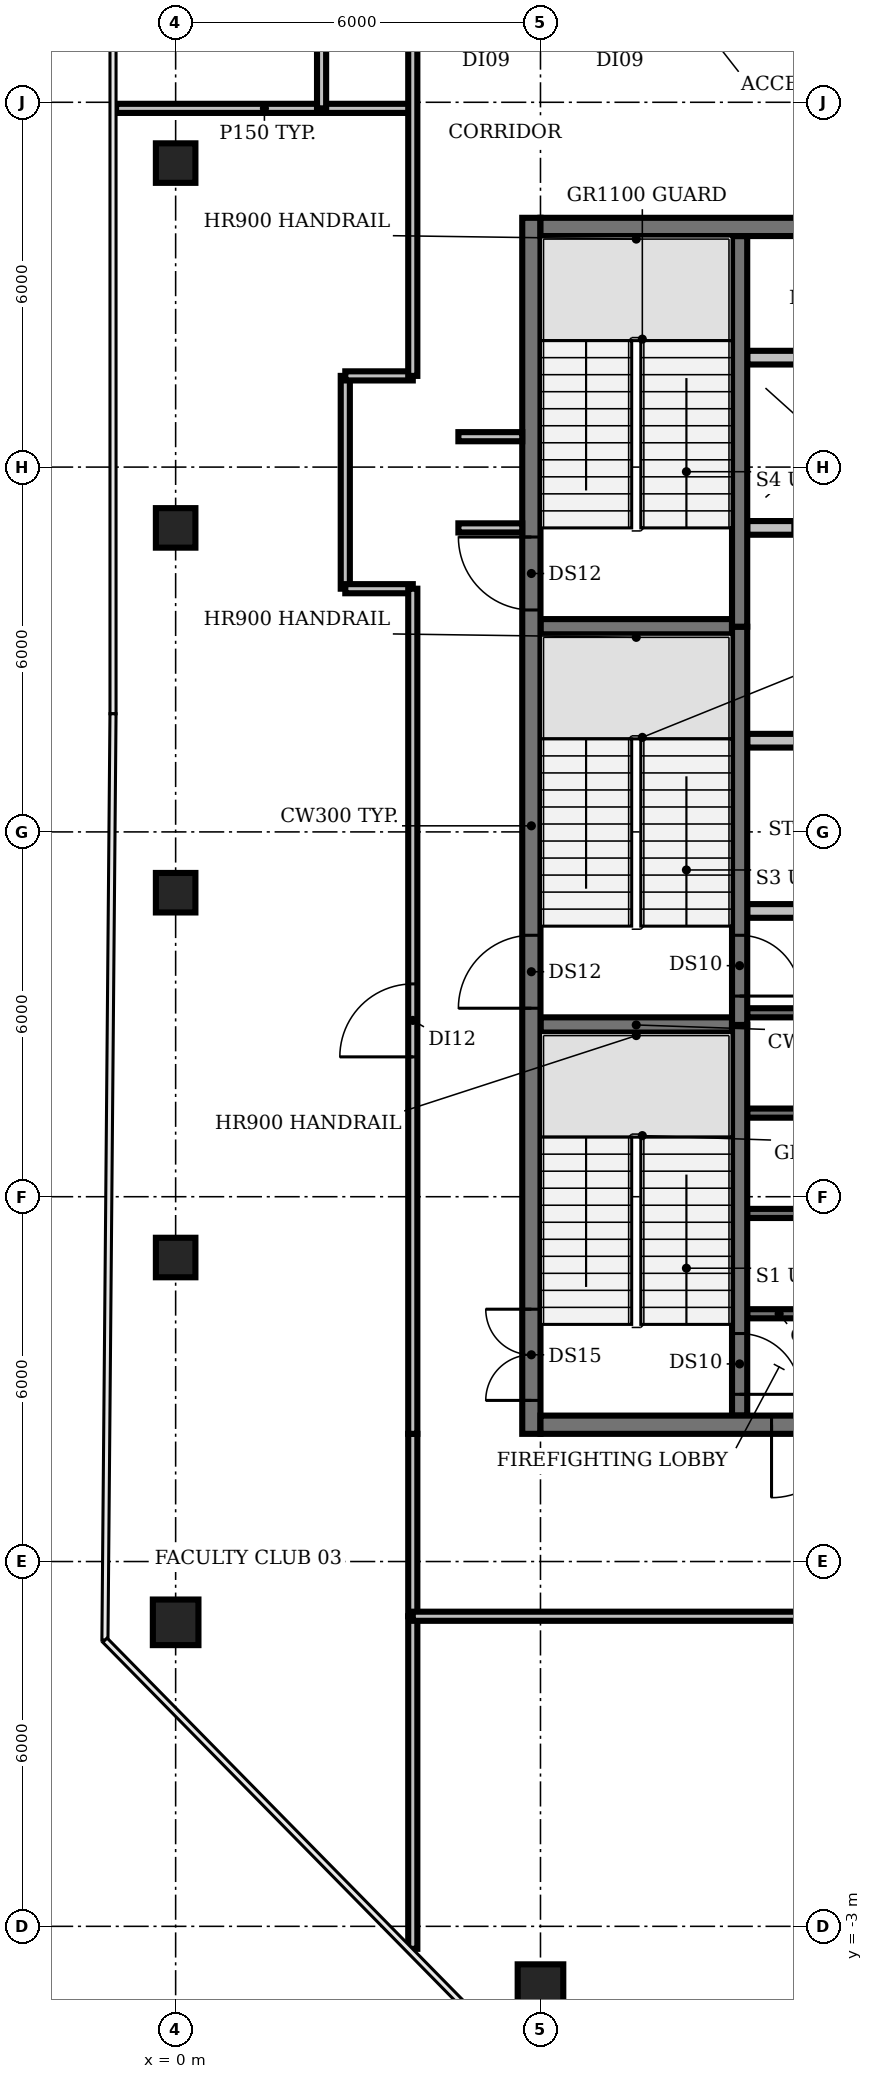
"""IFC4 building model, lengths in metres.
Left out: names, types, materials, properties, quantities, classifications, styles, units other than length and angle.
Written with IfcOpenShell. Run it as: python <this file> out.ifc"""

import sys

from ifc_helpers import new_model, si_unit, direction, frame, frame_2d, origin, origin_2d, place, context, subcontext, project, spatial, rectangle, circle, extrude, element, fill, save


model = new_model("IFC4")
c1 = context("Model", 3, precision=1e-05, world=origin(), true_north=direction((0.0, 1.0)))
c2 = subcontext(c1, "Body", "Model", "MODEL_VIEW")
j1 = project(units=[si_unit("LENGTHUNIT", "METRE"), si_unit("PLANEANGLEUNIT", "RADIAN")], contexts=[c1])
p1 = place(None, origin())
s1 = spatial("IfcSite", under=j1, at=p1, CompositionType="ELEMENT")
p2 = place(p1, origin())
s2 = spatial("IfcBuilding", under=s1, at=p2, CompositionType="ELEMENT")
p3 = place(p2, frame((0.0, 0.0, 335.6)))
s3 = spatial("IfcBuildingStorey", under=s2, at=p3, CompositionType="ELEMENT", Elevation=335.6)
p4 = place(p3, frame((0.0, 2.0, 0.0), z_axis=(0.0, 0.0, 1.0), x_axis=(1.0, 0.0, 0.0)))
e1 = element("IfcColumn", 1, at=p4, inside=s3, PredefinedType="COLUMN", context=c2, shape_type="SweptSolid", body=[
    extrude(circle(Radius=0.375, at=origin_2d()), origin(), (0.0, 0.0, 1.0), 3.9),
])
for number, where, z_axis, x_axis in (
    (2, (0.0, 8.0, 0.0), (0.0, 0.0, 1.0), (1.0, 0.0, 0.0)),
    (3, (0.0, 14.0, 0.0), (0.0, 0.0, 1.0), (1.0, 0.0, 0.0)),
    (4, (0.0, 20.0, 0.0), (0.0, 0.0, 1.0), (1.0, 0.0, 0.0)),
    (5, (0.0, 26.0, 0.0), (0.0, 0.0, 1.0), (1.0, 0.0, 0.0)),
):
    element("IfcColumn", number, at=place(p3, frame(where, z_axis=z_axis, x_axis=x_axis)), inside=s3, PredefinedType="COLUMN", context=c2, shape_type="SweptSolid", body=[
        extrude(rectangle(XDim=0.65, YDim=0.65, at=origin_2d()), origin(), (0.0, 0.0, 1.0), 3.9),
    ])
p5 = place(p3, frame((6.0, -4.0, 0.0), z_axis=(0.0, 0.0, 1.0), x_axis=(1.0, 0.0, 0.0)))
e6 = element("IfcColumn", 6, at=p5, inside=s3, PredefinedType="COLUMN", context=c2, shape_type="SweptSolid", body=[
    extrude(circle(Radius=0.375, at=origin_2d()), origin(), (0.0, 0.0, 1.0), 3.9),
])
for number, where, z_axis, x_axis in (
    (7, (9.4, 7.075, 0.0), (0.0, 0.0, 1.0), (1.0, 0.0, 0.0)),
    (8, (9.4, 8.725, 0.0), (0.0, 0.0, 1.0), (1.0, 0.0, 0.0)),
    (9, (9.4, 10.375, 0.0), (0.0, 0.0, 1.0), (1.0, 0.0, 0.0)),
):
    element("IfcWall", number, at=place(p3, frame(where, z_axis=z_axis, x_axis=x_axis)), inside=s3, PredefinedType="SHEAR", context=c2, shape_type="SweptSolid", body=[
        extrude(rectangle(XDim=1.05, YDim=0.15, at=frame_2d((0.525, 0.0))), origin(), (0.0, 0.0, 1.0), 3.9),
    ])
p6 = place(p3, frame((6.0, 11.825, 0.0), z_axis=(0.0, 0.0, 1.0), x_axis=(1.0, 0.0, 0.0)))
e10 = element("IfcWall", 10, at=p6, inside=s3, PredefinedType="SHEAR", context=c2, shape_type="SweptSolid", body=[
    extrude(rectangle(XDim=3.15, YDim=0.25, at=frame_2d((1.575, 0.0))), origin(), (0.0, 0.0, 1.0), 3.9),
])
p7 = place(p3, frame((9.4, 12.025, 0.0), z_axis=(0.0, 0.0, 1.0), x_axis=(1.0, 0.0, 0.0)))
e11 = element("IfcWall", 11, at=p7, inside=s3, PredefinedType="SHEAR", context=c2, shape_type="SweptSolid", body=[
    extrude(rectangle(XDim=1.05, YDim=0.15, at=frame_2d((0.525, 0.0))), origin(), (0.0, 0.0, 1.0), 3.9),
])
p8 = place(p3, frame((9.4, 13.7, 0.0), z_axis=(0.0, 0.0, 1.0), x_axis=(1.0, 0.0, 0.0)))
e12 = element("IfcWall", 12, at=p8, inside=s3, PredefinedType="PARTITIONING", context=c2, shape_type="SweptSolid", body=[
    extrude(rectangle(XDim=4.0, YDim=0.225, at=frame_2d((2.0, 0.0))), origin(), (0.0, 0.0, 1.0), 3.9),
])
p9 = place(p3, frame((9.4, 16.5, 0.0), z_axis=(0.0, 0.0, 1.0), x_axis=(1.0, 0.0, 0.0)))
e13 = element("IfcWall", 13, at=p9, inside=s3, PredefinedType="PARTITIONING", context=c2, shape_type="SweptSolid", body=[
    extrude(rectangle(XDim=14.6, YDim=0.225, at=frame_2d((7.3, 0.0))), origin(), (0.0, 0.0, 1.0), 3.9),
])
p10 = place(p9, frame((0.85, 0.0, 0.0)))
e14 = element("IfcOpeningElement", 14, at=p10, cuts=e13, PredefinedType="OPENING", context=c2, shape_type="SweptSolid", body=[
    extrude(rectangle(XDim=0.9, YDim=2.1, at=frame_2d((0.45, 1.05))), frame((0.0, 0.123, 0.0), z_axis=(0.0, -1.0, 0.0), x_axis=(1.0, 0.0, 0.0)), (0.0, 0.0, 1.0), 0.245),
])
p11 = place(p9, frame((3.625, 0.0, 0.0)))
e15 = element("IfcOpeningElement", 15, at=p11, cuts=e13, PredefinedType="OPENING", context=c2, shape_type="SweptSolid", body=[
    extrude(rectangle(XDim=0.9, YDim=2.1, at=frame_2d((0.45, 1.05))), frame((0.0, 0.123, 0.0), z_axis=(0.0, -1.0, 0.0), x_axis=(1.0, 0.0, 0.0)), (0.0, 0.0, 1.0), 0.245),
])
p12 = place(p9, frame((7.775, 0.0, 0.0)))
e16 = element("IfcOpeningElement", 16, at=p12, cuts=e13, PredefinedType="OPENING", context=c2, shape_type="SweptSolid", body=[
    extrude(rectangle(XDim=1.0, YDim=2.1, at=frame_2d((0.5, 1.05))), frame((0.0, 0.123, 0.0), z_axis=(0.0, -1.0, 0.0), x_axis=(1.0, 0.0, 0.0)), (0.0, 0.0, 1.0), 0.245),
])
p13 = place(p9, frame((11.647, 0.0, 0.0)))
e17 = element("IfcOpeningElement", 17, at=p13, cuts=e13, PredefinedType="OPENING", context=c2, shape_type="SweptSolid", body=[
    extrude(rectangle(XDim=0.9, YDim=2.1, at=frame_2d((0.45, 1.05))), frame((0.0, 0.123, 0.0), z_axis=(0.0, -1.0, 0.0), x_axis=(1.0, 0.0, 0.0)), (0.0, 0.0, 1.0), 0.245),
])
p14 = place(p9, frame((13.423, 0.0, 0.0)))
e18 = element("IfcOpeningElement", 18, at=p14, cuts=e13, PredefinedType="OPENING", context=c2, shape_type="SweptSolid", body=[
    extrude(rectangle(XDim=0.9, YDim=2.1, at=frame_2d((0.45, 1.05))), frame((0.0, 0.123, 0.0), z_axis=(0.0, -1.0, 0.0), x_axis=(1.0, 0.0, 0.0)), (0.0, 0.0, 1.0), 0.245),
])
p15 = place(p3, frame((6.0, 18.375, 0.0), z_axis=(0.0, 0.0, 1.0), x_axis=(1.0, 0.0, 0.0)))
e19 = element("IfcWall", 19, at=p15, inside=s3, PredefinedType="SHEAR", context=c2, shape_type="SweptSolid", body=[
    extrude(rectangle(XDim=3.15, YDim=0.25, at=frame_2d((1.575, 0.0))), origin(), (0.0, 0.0, 1.0), 3.9),
])
p16 = place(p3, frame((24.0, 20.0, 0.0), z_axis=(0.0, 0.0, 1.0), x_axis=(-1.0, 0.0, 0.0)))
e20 = element("IfcWall", 20, at=p16, inside=s3, PredefinedType="PARTITIONING", context=c2, shape_type="SweptSolid", body=[
    extrude(rectangle(XDim=14.6, YDim=0.225, at=frame_2d((7.3, 0.0))), origin(), (0.0, 0.0, 1.0), 3.9),
])
p17 = place(p16, frame((12.75, 0.0, 0.0)))
e21 = element("IfcOpeningElement", 21, at=p17, cuts=e20, PredefinedType="OPENING", context=c2, shape_type="SweptSolid", body=[
    extrude(rectangle(XDim=1.1, YDim=2.1, at=frame_2d((0.55, 1.05))), frame((0.0, 0.123, 0.0), z_axis=(0.0, -1.0, 0.0), x_axis=(1.0, 0.0, 0.0)), (0.0, 0.0, 1.0), 0.245),
])
p18 = place(p16, frame((9.95, 0.0, 0.0)))
e22 = element("IfcOpeningElement", 22, at=p18, cuts=e20, PredefinedType="OPENING", context=c2, shape_type="SweptSolid", body=[
    extrude(rectangle(XDim=1.1, YDim=2.1, at=frame_2d((0.55, 1.05))), frame((0.0, 0.123, 0.0), z_axis=(0.0, -1.0, 0.0), x_axis=(1.0, 0.0, 0.0)), (0.0, 0.0, 1.0), 0.245),
])
p19 = place(p16, frame((7.15, 0.0, 0.0)))
e23 = element("IfcOpeningElement", 23, at=p19, cuts=e20, PredefinedType="OPENING", context=c2, shape_type="SweptSolid", body=[
    extrude(rectangle(XDim=1.1, YDim=2.1, at=frame_2d((0.55, 1.05))), frame((0.0, 0.123, 0.0), z_axis=(0.0, -1.0, 0.0), x_axis=(1.0, 0.0, 0.0)), (0.0, 0.0, 1.0), 0.245),
])
p20 = place(p16, frame((4.35, 0.0, 0.0)))
e24 = element("IfcOpeningElement", 24, at=p20, cuts=e20, PredefinedType="OPENING", context=c2, shape_type="SweptSolid", body=[
    extrude(rectangle(XDim=1.1, YDim=2.1, at=frame_2d((0.55, 1.05))), frame((0.0, 0.123, 0.0), z_axis=(0.0, -1.0, 0.0), x_axis=(1.0, 0.0, 0.0)), (0.0, 0.0, 1.0), 0.245),
])
p21 = place(p16, frame((2.137, 0.0, 0.0)))
e25 = element("IfcOpeningElement", 25, at=p21, cuts=e20, PredefinedType="OPENING", context=c2, shape_type="SweptSolid", body=[
    extrude(rectangle(XDim=0.9, YDim=2.1, at=frame_2d((0.45, 1.05))), frame((0.0, 0.123, 0.0), z_axis=(0.0, -1.0, 0.0), x_axis=(1.0, 0.0, 0.0)), (0.0, 0.0, 1.0), 0.245),
])
p22 = place(p16, frame((0.562, 0.0, 0.0)))
e26 = element("IfcOpeningElement", 26, at=p22, cuts=e20, PredefinedType="OPENING", context=c2, shape_type="SweptSolid", body=[
    extrude(rectangle(XDim=0.9, YDim=2.1, at=frame_2d((0.45, 1.05))), frame((0.0, 0.123, 0.0), z_axis=(0.0, -1.0, 0.0), x_axis=(1.0, 0.0, 0.0)), (0.0, 0.0, 1.0), 0.245),
])
p23 = place(p3, frame((9.4, 22.8, 0.0), z_axis=(0.0, 0.0, 1.0), x_axis=(1.0, 0.0, 0.0)))
e27 = element("IfcWall", 27, at=p23, inside=s3, PredefinedType="PARTITIONING", context=c2, shape_type="SweptSolid", body=[
    extrude(rectangle(XDim=14.6, YDim=0.225, at=frame_2d((7.3, 0.0))), origin(), (0.0, 0.0, 1.0), 3.9),
])
p24 = place(p3, frame((9.275, 11.825, 0.0), z_axis=(0.0, 0.0, 1.0), x_axis=(0.0, -1.0, 0.0)))
e28 = element("IfcWall", 28, at=p24, inside=s3, PredefinedType="SHEAR", context=c2, shape_type="SweptSolid", body=[
    extrude(rectangle(XDim=6.425, YDim=0.25, at=frame_2d((3.212, 0.0))), origin(), (0.0, 0.0, 1.0), 3.9),
])
p25 = place(p24, frame((5.075, 0.0, 0.0)))
e29 = element("IfcOpeningElement", 29, at=p25, cuts=e28, PredefinedType="OPENING", context=c2, shape_type="SweptSolid", body=[
    extrude(rectangle(XDim=1.0, YDim=2.1, at=frame_2d((0.5, 1.05))), frame((0.0, 0.135, 0.0), z_axis=(0.0, -1.0, 0.0), x_axis=(1.0, 0.0, 0.0)), (0.0, 0.0, 1.0), 0.27),
])
p26 = place(p3, frame((9.275, 18.375, 0.0), z_axis=(0.0, 0.0, 1.0), x_axis=(0.0, -1.0, 0.0)))
e30 = element("IfcWall", 30, at=p26, inside=s3, PredefinedType="SHEAR", context=c2, shape_type="SweptSolid", body=[
    extrude(rectangle(XDim=6.55, YDim=0.25, at=frame_2d((3.275, 0.0))), origin(), (0.0, 0.0, 1.0), 3.9),
])
p27 = place(p26, frame((5.075, 0.0, 0.0)))
e31 = element("IfcOpeningElement", 31, at=p27, cuts=e30, PredefinedType="OPENING", context=c2, shape_type="SweptSolid", body=[
    extrude(rectangle(XDim=1.0, YDim=2.1, at=frame_2d((0.5, 1.05))), frame((0.0, 0.135, 0.0), z_axis=(0.0, -1.0, 0.0), x_axis=(1.0, 0.0, 0.0)), (0.0, 0.0, 1.0), 0.27),
])
p28 = place(p3, frame((9.275, 18.375, 0.0), z_axis=(0.0, 0.0, 1.0), x_axis=(0.0, 1.0, 0.0)))
e32 = element("IfcWall", 32, at=p28, inside=s3, PredefinedType="SHEAR", context=c2, shape_type="SweptSolid", body=[
    extrude(rectangle(XDim=6.425, YDim=0.25, at=frame_2d((3.212, 0.0))), origin(), (0.0, 0.0, 1.0), 3.9),
])
p29 = place(p3, frame((5.85, 5.1, 0.0), z_axis=(0.0, 0.0, 1.0), x_axis=(0.0, 1.0, 0.0)))
e33 = element("IfcWall", 33, at=p29, inside=s3, PredefinedType="SHEAR", context=c2, shape_type="SweptSolid", body=[
    extrude(rectangle(XDim=20.0, YDim=0.3, at=frame_2d((10.0, 0.0))), origin(), (0.0, 0.0, 1.0), 3.9),
])
p30 = place(p29, frame((0.55, 0.0, 0.0)))
e34 = element("IfcOpeningElement", 34, at=p30, cuts=e33, PredefinedType="OPENING", context=c2, shape_type="SweptSolid", body=[
    extrude(rectangle(XDim=1.5, YDim=2.1, at=frame_2d((0.75, 1.05))), frame((0.0, 0.16, 0.0), z_axis=(0.0, -1.0, 0.0), x_axis=(1.0, 0.0, 0.0)), (0.0, 0.0, 1.0), 0.32),
])
p31 = place(p29, frame((7.0, 0.0, 0.0)))
e35 = element("IfcOpeningElement", 35, at=p31, cuts=e33, PredefinedType="OPENING", context=c2, shape_type="SweptSolid", body=[
    extrude(rectangle(XDim=1.2, YDim=2.1, at=frame_2d((0.6, 1.05))), frame((0.0, 0.16, 0.0), z_axis=(0.0, -1.0, 0.0), x_axis=(1.0, 0.0, 0.0)), (0.0, 0.0, 1.0), 0.32),
])
p32 = place(p29, frame((13.55, 0.0, 0.0)))
e36 = element("IfcOpeningElement", 36, at=p32, cuts=e33, PredefinedType="OPENING", context=c2, shape_type="SweptSolid", body=[
    extrude(rectangle(XDim=1.2, YDim=2.1, at=frame_2d((0.6, 1.05))), frame((0.0, 0.16, 0.0), z_axis=(0.0, -1.0, 0.0), x_axis=(1.0, 0.0, 0.0)), (0.0, 0.0, 1.0), 0.32),
])
p33 = place(p3, frame((24.0, 5.25, 0.0), z_axis=(0.0, 0.0, 1.0), x_axis=(-1.0, 0.0, 0.0)))
e37 = element("IfcWall", 37, at=p33, inside=s3, PredefinedType="SHEAR", context=c2, shape_type="SweptSolid", body=[
    extrude(rectangle(XDim=18.0, YDim=0.3, at=frame_2d((9.0, 0.0))), origin(), (0.0, 0.0, 1.0), 3.9),
])
p34 = place(p33, frame((13.0, 0.0, 0.0)))
e38 = element("IfcOpeningElement", 38, at=p34, cuts=e37, PredefinedType="OPENING", context=c2, shape_type="SweptSolid", body=[
    extrude(rectangle(XDim=1.2, YDim=2.1, at=frame_2d((0.6, 1.05))), frame((0.0, 0.16, 0.0), z_axis=(0.0, -1.0, 0.0), x_axis=(1.0, 0.0, 0.0)), (0.0, 0.0, 1.0), 0.32),
])
p35 = place(p33, frame((4.9, 0.0, 0.0)))
e39 = element("IfcOpeningElement", 39, at=p35, cuts=e37, PredefinedType="OPENING", context=c2, shape_type="SweptSolid", body=[
    extrude(rectangle(XDim=1.0, YDim=2.1, at=frame_2d((0.5, 1.05))), frame((0.0, 0.16, 0.0), z_axis=(0.0, -1.0, 0.0), x_axis=(1.0, 0.0, 0.0)), (0.0, 0.0, 1.0), 0.32),
])
p36 = place(p3, frame((6.0, 24.95, 0.0), z_axis=(0.0, 0.0, 1.0), x_axis=(1.0, 0.0, 0.0)))
e40 = element("IfcWall", 40, at=p36, inside=s3, PredefinedType="SHEAR", context=c2, shape_type="SweptSolid", body=[
    extrude(rectangle(XDim=18.0, YDim=0.3, at=frame_2d((9.0, 0.0))), origin(), (0.0, 0.0, 1.0), 3.9),
])
p37 = place(p3, frame((-0.98, 26.9, 0.0), z_axis=(0.0, 0.0, 1.0), x_axis=(1.0, 0.0, 0.0)))
e41 = element("IfcWall", 41, at=p37, inside=s3, PredefinedType="PARTITIONING", context=c2, shape_type="SweptSolid", body=[
    extrude(rectangle(XDim=4.88, YDim=0.15, at=frame_2d((2.44, 0.0))), origin(), (0.0, 0.0, 1.0), 2.95),
])
p38 = place(p3, frame((2.4, 26.9, 0.0), z_axis=(0.0, 0.0, 1.0), x_axis=(0.0, 1.0, 0.0)))
e42 = element("IfcWall", 42, at=p38, inside=s3, PredefinedType="PARTITIONING", context=c2, shape_type="SweptSolid", body=[
    extrude(rectangle(XDim=6.0, YDim=0.15, at=frame_2d((3.0, 0.0))), origin(), (0.0, 0.0, 1.0), 2.95),
])
p39 = place(p3, frame((2.79, 19.0, 0.0), z_axis=(0.0, 0.0, 1.0), x_axis=(0.0, 1.0, 0.0)))
e43 = element("IfcWall", 43, at=p39, inside=s3, PredefinedType="PARTITIONING", context=c2, shape_type="SweptSolid", body=[
    extrude(rectangle(XDim=3.5, YDim=0.15, at=frame_2d((1.75, 0.0))), origin(), (0.0, 0.0, 1.0), 2.95),
])
for number, where, z_axis, x_axis in (
    (44, (2.79, 19.0, 0.0), (0.0, 0.0, 1.0), (1.0, 0.0, 0.0)),
    (45, (2.79, 22.5, 0.0), (0.0, 0.0, 1.0), (1.0, 0.0, 0.0)),
):
    element("IfcWall", number, at=place(p3, frame(where, z_axis=z_axis, x_axis=x_axis)), inside=s3, PredefinedType="PARTITIONING", context=c2, shape_type="SweptSolid", body=[
        extrude(rectangle(XDim=1.11, YDim=0.15, at=frame_2d((0.555, 0.0))), origin(), (0.0, 0.0, 1.0), 2.95),
    ])
p40 = place(p3, frame((3.9, -3.37, 0.0), z_axis=(0.0, 0.0, 1.0), x_axis=(0.0, 1.0, 0.0)))
e46 = element("IfcWall", 46, at=p40, inside=s3, PredefinedType="PARTITIONING", context=c2, shape_type="SweptSolid", body=[
    extrude(rectangle(XDim=5.47, YDim=0.15, at=frame_2d((2.735, 0.0))), origin(), (0.0, 0.0, 1.0), 2.95),
])
p41 = place(p3, frame((3.9, 2.1, 0.0), z_axis=(0.0, 0.0, 1.0), x_axis=(0.0, 1.0, 0.0)))
e47 = element("IfcWall", 47, at=p41, inside=s3, PredefinedType="PARTITIONING", context=c2, shape_type="SweptSolid", body=[
    extrude(rectangle(XDim=3.0, YDim=0.15, at=frame_2d((1.5, 0.0))), origin(), (0.0, 0.0, 1.0), 2.95),
])
p42 = place(p3, frame((3.9, 5.1, 0.0), z_axis=(0.0, 0.0, 1.0), x_axis=(0.0, 1.0, 0.0)))
e48 = element("IfcWall", 48, at=p42, inside=s3, PredefinedType="PARTITIONING", context=c2, shape_type="SweptSolid", body=[
    extrude(rectangle(XDim=13.9, YDim=0.15, at=frame_2d((6.95, 0.0))), origin(), (0.0, 0.0, 1.0), 2.95),
])
p43 = place(p42, frame((6.2, 0.0, 0.0)))
e49 = element("IfcOpeningElement", 49, at=p43, cuts=e48, PredefinedType="OPENING", context=c2, shape_type="SweptSolid", body=[
    extrude(rectangle(XDim=1.2, YDim=2.1, at=frame_2d((0.6, 1.05))), frame((0.0, 0.085, 0.0), z_axis=(0.0, -1.0, 0.0), x_axis=(1.0, 0.0, 0.0)), (0.0, 0.0, 1.0), 0.17),
])
p44 = place(p3, frame((3.9, 22.5, 0.0), z_axis=(0.0, 0.0, 1.0), x_axis=(0.0, 1.0, 0.0)))
e50 = element("IfcWall", 50, at=p44, inside=s3, PredefinedType="PARTITIONING", context=c2, shape_type="SweptSolid", body=[
    extrude(rectangle(XDim=5.6, YDim=0.15, at=frame_2d((2.8, 0.0))), origin(), (0.0, 0.0, 1.0), 2.95),
])
for number, where, z_axis, x_axis in (
    (51, (4.65, 20.0, 0.0), (0.0, 0.0, 1.0), (1.0, 0.0, 0.0)),
    (52, (4.65, 21.5, 0.0), (0.0, 0.0, 1.0), (1.0, 0.0, 0.0)),
):
    element("IfcWall", number, at=place(p3, frame(where, z_axis=z_axis, x_axis=x_axis)), inside=s3, PredefinedType="PARTITIONING", context=c2, shape_type="SweptSolid", body=[
        extrude(rectangle(XDim=1.05, YDim=0.15, at=frame_2d((0.525, 0.0))), origin(), (0.0, 0.0, 1.0), 2.95),
    ])
p45 = place(p3, frame((26.1, 2.1, 0.0), z_axis=(0.0, 0.0, 1.0), x_axis=(-1.0, 0.0, 0.0)))
e53 = element("IfcWall", 53, at=p45, inside=s3, PredefinedType="PARTITIONING", context=c2, shape_type="SweptSolid", body=[
    extrude(rectangle(XDim=22.2, YDim=0.15, at=frame_2d((11.1, 0.0))), origin(), (0.0, 0.0, 1.0), 2.95),
])
p46 = place(p45, frame((10.6, 0.0, 0.0)))
e54 = element("IfcOpeningElement", 54, at=p46, cuts=e53, PredefinedType="OPENING", context=c2, shape_type="SweptSolid", body=[
    extrude(rectangle(XDim=1.2, YDim=2.1, at=frame_2d((0.6, 1.05))), frame((0.0, 0.085, 0.0), z_axis=(0.0, -1.0, 0.0), x_axis=(1.0, 0.0, 0.0)), (0.0, 0.0, 1.0), 0.17),
])
p47 = place(p25, origin())
e55 = element("IfcDoor", 55, at=p47, inside=s3, OperationType="SINGLE_SWING_RIGHT", PredefinedType="DOOR", context=c2, shape_type="SweptSolid", body=[
    extrude(rectangle(XDim=1.0, YDim=2.1, at=frame_2d((0.5, 1.05))), frame((0.0, 0.025, 0.0), z_axis=(0.0, -1.0, 0.0), x_axis=(1.0, 0.0, 0.0)), (0.0, 0.0, 1.0), 0.05),
])
fill(e29, e55)
p48 = place(p27, origin())
e56 = element("IfcDoor", 56, at=p48, inside=s3, OperationType="SINGLE_SWING_RIGHT", PredefinedType="DOOR", context=c2, shape_type="SweptSolid", body=[
    extrude(rectangle(XDim=1.0, YDim=2.1, at=frame_2d((0.5, 1.05))), frame((0.0, 0.025, 0.0), z_axis=(0.0, -1.0, 0.0), x_axis=(1.0, 0.0, 0.0)), (0.0, 0.0, 1.0), 0.05),
])
fill(e31, e56)
p49 = place(p30, origin())
e57 = element("IfcDoor", 57, at=p49, inside=s3, OperationType="DOUBLE_DOOR_SINGLE_SWING", PredefinedType="DOOR", context=c2, shape_type="SweptSolid", body=[
    extrude(rectangle(XDim=1.5, YDim=2.1, at=frame_2d((0.75, 1.05))), frame((0.0, 0.025, 0.0), z_axis=(0.0, -1.0, 0.0), x_axis=(1.0, 0.0, 0.0)), (0.0, 0.0, 1.0), 0.05),
])
fill(e34, e57)
p50 = place(p31, origin())
e58 = element("IfcDoor", 58, at=p50, inside=s3, OperationType="SINGLE_SWING_LEFT", PredefinedType="DOOR", context=c2, shape_type="SweptSolid", body=[
    extrude(rectangle(XDim=1.2, YDim=2.1, at=frame_2d((0.6, 1.05))), frame((0.0, 0.025, 0.0), z_axis=(0.0, -1.0, 0.0), x_axis=(1.0, 0.0, 0.0)), (0.0, 0.0, 1.0), 0.05),
])
fill(e35, e58)
p51 = place(p32, origin())
e59 = element("IfcDoor", 59, at=p51, inside=s3, OperationType="SINGLE_SWING_RIGHT", PredefinedType="DOOR", context=c2, shape_type="SweptSolid", body=[
    extrude(rectangle(XDim=1.2, YDim=2.1, at=frame_2d((0.6, 1.05))), frame((0.0, 0.025, 0.0), z_axis=(0.0, -1.0, 0.0), x_axis=(1.0, 0.0, 0.0)), (0.0, 0.0, 1.0), 0.05),
])
fill(e36, e59)
p52 = place(p34, origin())
e60 = element("IfcDoor", 60, at=p52, inside=s3, OperationType="SINGLE_SWING_RIGHT", PredefinedType="DOOR", context=c2, shape_type="SweptSolid", body=[
    extrude(rectangle(XDim=1.2, YDim=2.1, at=frame_2d((0.6, 1.05))), frame((0.0, 0.025, 0.0), z_axis=(0.0, -1.0, 0.0), x_axis=(1.0, 0.0, 0.0)), (0.0, 0.0, 1.0), 0.05),
])
fill(e38, e60)
p53 = place(p43, origin())
e61 = element("IfcDoor", 61, at=p53, inside=s3, OperationType="SINGLE_SWING_LEFT", PredefinedType="DOOR", context=c2, shape_type="SweptSolid", body=[
    extrude(rectangle(XDim=1.2, YDim=2.1, at=frame_2d((0.6, 1.05))), frame((0.0, 0.025, 0.0), z_axis=(0.0, -1.0, 0.0), x_axis=(1.0, 0.0, 0.0)), (0.0, 0.0, 1.0), 0.05),
])
fill(e49, e61)
save(model, sys.argv[1])
